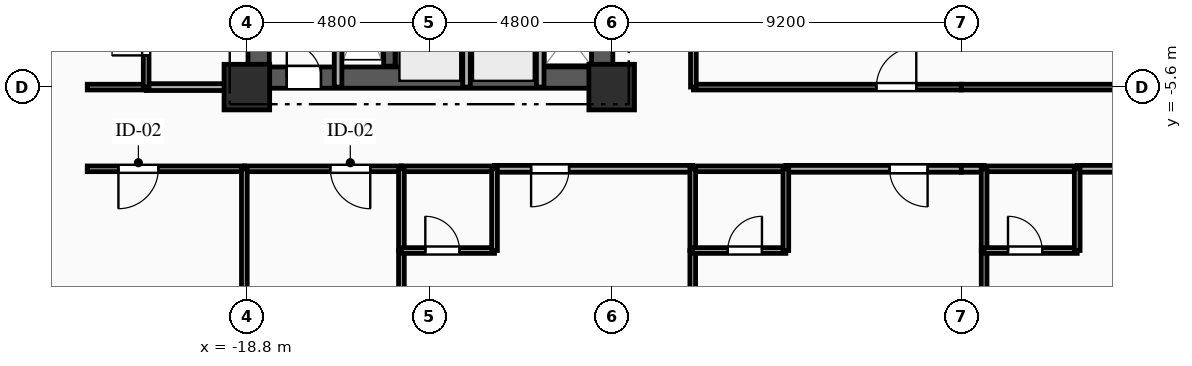
"""IFC4 building model, lengths in metres.
Left out: names, types, materials, properties, quantities, classifications, styles, units other than length and angle.
Written with IfcOpenShell. Run it as: python <this file> out.ifc"""

import sys

from ifc_helpers import new_model, si_unit, direction, frame, frame_2d, origin, origin_2d, place, context, subcontext, project, spatial, rectangle, extrude, element, fill, save


model = new_model("IFC4")
c1 = context("Model", 3, precision=1e-05, world=origin(), true_north=direction((0.0, 1.0)))
c2 = subcontext(c1, "Body", "Model", "MODEL_VIEW")
j1 = project(units=[si_unit("LENGTHUNIT", "METRE"), si_unit("PLANEANGLEUNIT", "RADIAN")], contexts=[c1])
p1 = place(None, origin())
s1 = spatial("IfcSite", under=j1, at=p1, CompositionType="ELEMENT")
p2 = place(p1, origin())
s2 = spatial("IfcBuilding", under=s1, at=p2, CompositionType="ELEMENT")
p3 = place(p2, frame((0.0, 0.0, 40.4)))
s3 = spatial("IfcBuildingStorey", under=s2, at=p3, CompositionType="ELEMENT", Elevation=40.4)
for number, where, z_axis, x_axis in (
    (1, (-18.8, -5.6, 0.0), (0.0, 0.0, 1.0), (1.0, 0.0, 0.0)),
    (2, (-9.2, -5.6, 0.0), (0.0, 0.0, 1.0), (1.0, 0.0, 0.0)),
):
    element("IfcColumn", number, at=place(p3, frame(where, z_axis=z_axis, x_axis=x_axis)), inside=s3, PredefinedType="COLUMN", context=c2, shape_type="SweptSolid", body=[
        extrude(rectangle(XDim=1.2, YDim=1.2, at=origin_2d()), origin(), (0.0, 0.0, 1.0), 3.35),
    ])
p4 = place(p3, frame((-18.8, -5.35, 0.0), z_axis=(0.0, 0.0, 1.0), x_axis=(1.0, 0.0, 0.0)))
e3 = element("IfcWall", 3, at=p4, inside=s3, PredefinedType="SHEAR", context=c2, shape_type="SweptSolid", body=[
    extrude(rectangle(XDim=9.6, YDim=0.56, at=frame_2d((4.8, 0.0))), origin(), (0.0, 0.0, 1.0), 3.035),
])
p5 = place(p4, frame((1.05, 0.0, 0.0)))
e4 = element("IfcOpeningElement", 4, at=p5, cuts=e3, PredefinedType="OPENING", context=c2, shape_type="SweptSolid", body=[
    extrude(rectangle(XDim=0.9, YDim=2.1, at=frame_2d((0.45, 1.05))), frame((0.0, 0.29, 0.0), z_axis=(0.0, -1.0, 0.0), x_axis=(1.0, 0.0, 0.0)), (0.0, 0.0, 1.0), 0.58),
])
p6 = place(p3, frame((-18.49, -5.05, 0.0), z_axis=(0.0, 0.0, 1.0), x_axis=(0.0, 1.0, 0.0)))
e5 = element("IfcWall", 5, at=p6, inside=s3, PredefinedType="SHEAR", context=c2, shape_type="SweptSolid", body=[
    extrude(rectangle(XDim=10.1, YDim=0.56, at=frame_2d((5.05, 0.0))), origin(), (0.0, 0.0, 1.0), 3.035),
])
p7 = place(p3, frame((-9.45, -5.05, 0.0), z_axis=(0.0, 0.0, 1.0), x_axis=(0.0, 1.0, 0.0)))
e6 = element("IfcWall", 6, at=p7, inside=s3, PredefinedType="SHEAR", context=c2, shape_type="SweptSolid", body=[
    extrude(rectangle(XDim=10.1, YDim=0.56, at=frame_2d((5.05, 0.0))), origin(), (0.0, 0.0, 1.0), 3.035),
])
p8 = place(p7, frame((7.175, 0.0, 0.0)))
e7 = element("IfcOpeningElement", 7, at=p8, cuts=e6, PredefinedType="OPENING", context=c2, shape_type="SweptSolid", body=[
    extrude(rectangle(XDim=0.9, YDim=2.1, at=frame_2d((0.45, 1.05))), frame((0.0, 0.29, 0.0), z_axis=(0.0, -1.0, 0.0), x_axis=(1.0, 0.0, 0.0)), (0.0, 0.0, 1.0), 0.58),
])
p9 = place(p7, frame((2.4, 0.0, 0.0)))
e8 = element("IfcOpeningElement", 8, at=p9, cuts=e6, PredefinedType="OPENING", context=c2, shape_type="SweptSolid", body=[
    extrude(rectangle(XDim=1.2, YDim=2.15, at=frame_2d((0.6, 1.075))), frame((0.0, 0.29, 0.0), z_axis=(0.0, -1.0, 0.0), x_axis=(1.0, 0.0, 0.0)), (0.0, 0.0, 1.0), 0.58),
])
p10 = place(p3, frame((-15.05, -5.05, 0.0), z_axis=(0.0, 0.0, 1.0), x_axis=(0.0, 1.0, 0.0)))
e9 = element("IfcWall", 9, at=p10, inside=s3, PredefinedType="SHEAR", context=c2, shape_type="SweptSolid", body=[
    extrude(rectangle(XDim=10.1, YDim=0.3, at=frame_2d((5.05, 0.0))), origin(), (0.0, 0.0, 1.0), 3.035),
])
p11 = place(p3, frame((-16.4, -5.6, 0.0), z_axis=(0.0, 0.0, 1.0), x_axis=(0.0, 1.0, 0.0)))
e10 = element("IfcWall", 10, at=p11, inside=s3, PredefinedType="PARTITIONING", context=c2, shape_type="SweptSolid", body=[
    extrude(rectangle(XDim=3.49, YDim=0.2, at=frame_2d((1.745, 0.0))), origin(), (0.0, 0.0, 1.0), 3.035),
])
for number, where, z_axis, x_axis in (
    (11, (-13.02, -5.6, 0.0), (0.0, 0.0, 1.0), (0.0, 1.0, 0.0)),
    (12, (-11.08, -5.6, 0.0), (0.0, 0.0, 1.0), (0.0, 1.0, 0.0)),
):
    element("IfcWall", number, at=place(p3, frame(where, z_axis=z_axis, x_axis=x_axis)), inside=s3, PredefinedType="PARTITIONING", context=c2, shape_type="SweptSolid", body=[
        extrude(rectangle(XDim=2.25, YDim=0.2, at=frame_2d((1.125, 0.0))), origin(), (0.0, 0.0, 1.0), 3.035),
    ])
p12 = place(p3, frame((-21.45, -5.6, 0.0), z_axis=(0.0, 0.0, 1.0), x_axis=(1.0, 0.0, 0.0)))
e13 = element("IfcWall", 13, at=p12, inside=s3, PredefinedType="PARTITIONING", context=c2, shape_type="SweptSolid", body=[
    extrude(rectangle(XDim=2.65, YDim=0.18, at=frame_2d((1.325, 0.0))), origin(), (0.0, 0.0, 1.0), 3.035),
])
p13 = place(p3, frame((-23.0, -5.6, 0.0), z_axis=(0.0, 0.0, 1.0), x_axis=(1.0, 0.0, 0.0)))
e14 = element("IfcWall", 14, at=p13, inside=s3, PredefinedType="PLUMBINGWALL", context=c2, shape_type="SweptSolid", body=[
    extrude(rectangle(XDim=1.55, YDim=0.15, at=frame_2d((0.775, 0.0))), origin(), (0.0, 0.0, 1.0), 3.035),
])
p14 = place(p3, frame((-18.866, -7.75, 0.0), z_axis=(0.0, 0.0, 1.0), x_axis=(-1.0, 0.0, 0.0)))
e15 = element("IfcWall", 15, at=p14, inside=s3, PredefinedType="PARTITIONING", context=c2, shape_type="SweptSolid", body=[
    extrude(rectangle(XDim=4.134, YDim=0.15, at=frame_2d((2.067, 0.0))), origin(), (0.0, 0.0, 1.0), 3.035),
])
p15 = place(p14, frame((2.263, 0.0, 0.0)))
e16 = element("IfcOpeningElement", 16, at=p15, cuts=e15, PredefinedType="OPENING", context=c2, shape_type="SweptSolid", body=[
    extrude(rectangle(XDim=1.05, YDim=2.15, at=frame_2d((0.525, 1.075))), frame((0.0, 0.085, 0.0), z_axis=(0.0, -1.0, 0.0), x_axis=(1.0, 0.0, 0.0)), (0.0, 0.0, 1.0), 0.17),
])
p16 = place(p3, frame((-14.733, -7.75, 0.0), z_axis=(0.0, 0.0, 1.0), x_axis=(-1.0, 0.0, 0.0)))
e17 = element("IfcWall", 17, at=p16, inside=s3, PredefinedType="PARTITIONING", context=c2, shape_type="SweptSolid", body=[
    extrude(rectangle(XDim=4.134, YDim=0.15, at=frame_2d((2.067, 0.0))), origin(), (0.0, 0.0, 1.0), 3.035),
])
p17 = place(p16, frame((0.82, 0.0, 0.0)))
e18 = element("IfcOpeningElement", 18, at=p17, cuts=e17, PredefinedType="OPENING", context=c2, shape_type="SweptSolid", body=[
    extrude(rectangle(XDim=1.05, YDim=2.15, at=frame_2d((0.525, 1.075))), frame((0.0, 0.085, 0.0), z_axis=(0.0, -1.0, 0.0), x_axis=(1.0, 0.0, 0.0)), (0.0, 0.0, 1.0), 0.17),
])
p18 = place(p3, frame((-7.067, -7.75, 0.0), z_axis=(0.0, 0.0, 1.0), x_axis=(-1.0, 0.0, 0.0)))
e19 = element("IfcWall", 19, at=p18, inside=s3, PredefinedType="PARTITIONING", context=c2, shape_type="SweptSolid", body=[
    extrude(rectangle(XDim=5.216, YDim=0.18, at=frame_2d((2.608, 0.0))), origin(), (0.0, 0.0, 1.0), 3.035),
])
p19 = place(p18, frame((3.254, 0.0, 0.0)))
e20 = element("IfcOpeningElement", 20, at=p19, cuts=e19, PredefinedType="OPENING", context=c2, shape_type="SweptSolid", body=[
    extrude(rectangle(XDim=1.0, YDim=2.15, at=frame_2d((0.5, 1.075))), frame((0.0, 0.1, 0.0), z_axis=(0.0, -1.0, 0.0), x_axis=(1.0, 0.0, 0.0)), (0.0, 0.0, 1.0), 0.2),
])
p20 = place(p3, frame((-12.283, -7.75, 0.0), z_axis=(0.0, 0.0, 1.0), x_axis=(-1.0, 0.0, 0.0)))
e21 = element("IfcWall", 21, at=p20, inside=s3, PredefinedType="PLUMBINGWALL", context=c2, shape_type="SweptSolid", body=[
    extrude(rectangle(XDim=2.45, YDim=0.15, at=frame_2d((1.225, 0.0))), origin(), (0.0, 0.0, 1.0), 3.035),
])
p21 = place(p3, frame((0.0, -7.75, 0.0), z_axis=(0.0, 0.0, 1.0), x_axis=(-1.0, 0.0, 0.0)))
e22 = element("IfcWall", 22, at=p21, inside=s3, PredefinedType="PARTITIONING", context=c2, shape_type="SweptSolid", body=[
    extrude(rectangle(XDim=4.617, YDim=0.18, at=frame_2d((2.309, 0.0))), origin(), (0.0, 0.0, 1.0), 3.035),
])
p22 = place(p21, frame((0.887, 0.0, 0.0)))
e23 = element("IfcOpeningElement", 23, at=p22, cuts=e22, PredefinedType="OPENING", context=c2, shape_type="SweptSolid", body=[
    extrude(rectangle(XDim=1.0, YDim=2.15, at=frame_2d((0.5, 1.075))), frame((0.0, 0.1, 0.0), z_axis=(0.0, -1.0, 0.0), x_axis=(1.0, 0.0, 0.0)), (0.0, 0.0, 1.0), 0.2),
])
p23 = place(p3, frame((-4.617, -7.75, 0.0), z_axis=(0.0, 0.0, 1.0), x_axis=(-1.0, 0.0, 0.0)))
e24 = element("IfcWall", 24, at=p23, inside=s3, PredefinedType="PLUMBINGWALL", context=c2, shape_type="SweptSolid", body=[
    extrude(rectangle(XDim=2.45, YDim=0.15, at=frame_2d((1.225, 0.0))), origin(), (0.0, 0.0, 1.0), 3.035),
])
p24 = place(p3, frame((-7.05, -5.6, 0.0), z_axis=(0.0, 0.0, 1.0), x_axis=(1.0, 0.0, 0.0)))
e25 = element("IfcWall", 25, at=p24, inside=s3, PredefinedType="PARTITIONING", context=c2, shape_type="SweptSolid", body=[
    extrude(rectangle(XDim=7.05, YDim=0.15, at=frame_2d((3.525, 0.0))), origin(), (0.0, 0.0, 1.0), 2.52),
])
p25 = place(p24, frame((4.815, 0.0, 0.0)))
e26 = element("IfcOpeningElement", 26, at=p25, cuts=e25, PredefinedType="OPENING", context=c2, shape_type="SweptSolid", body=[
    extrude(rectangle(XDim=1.05, YDim=2.15, at=frame_2d((0.525, 1.075))), frame((0.0, 0.085, 0.0), z_axis=(0.0, -1.0, 0.0), x_axis=(1.0, 0.0, 0.0)), (0.0, 0.0, 1.0), 0.17),
])
p26 = place(p3, frame((0.6, -7.75, 0.0), z_axis=(0.0, 0.0, 1.0), x_axis=(-1.0, 0.0, 0.0)))
e27 = element("IfcWall", 27, at=p26, inside=s3, PredefinedType="PARTITIONING", context=c2, shape_type="SweptSolid", body=[
    extrude(rectangle(XDim=0.6, YDim=0.18, at=frame_2d((0.3, 0.0))), origin(), (0.0, 0.0, 1.0), 3.035),
])
p27 = place(p3, frame((8.267, -7.75, 0.0), z_axis=(0.0, 0.0, 1.0), x_axis=(-1.0, 0.0, 0.0)))
e28 = element("IfcWall", 28, at=p27, inside=s3, PredefinedType="PARTITIONING", context=c2, shape_type="SweptSolid", body=[
    extrude(rectangle(XDim=5.217, YDim=0.18, at=frame_2d((2.608, 0.0))), origin(), (0.0, 0.0, 1.0), 3.035),
])
p28 = place(p27, frame((3.255, 0.0, 0.0)))
e29 = element("IfcOpeningElement", 29, at=p28, cuts=e28, PredefinedType="OPENING", context=c2, shape_type="SweptSolid", body=[
    extrude(rectangle(XDim=1.0, YDim=2.15, at=frame_2d((0.5, 1.075))), frame((0.0, 0.1, 0.0), z_axis=(0.0, -1.0, 0.0), x_axis=(1.0, 0.0, 0.0)), (0.0, 0.0, 1.0), 0.2),
])
p29 = place(p3, frame((3.05, -7.75, 0.0), z_axis=(0.0, 0.0, 1.0), x_axis=(-1.0, 0.0, 0.0)))
e30 = element("IfcWall", 30, at=p29, inside=s3, PredefinedType="PLUMBINGWALL", context=c2, shape_type="SweptSolid", body=[
    extrude(rectangle(XDim=2.45, YDim=0.15, at=frame_2d((1.225, 0.0))), origin(), (0.0, 0.0, 1.0), 3.035),
])
p30 = place(p3, frame((0.0, -5.6, 0.0), z_axis=(0.0, 0.0, 1.0), x_axis=(1.0, 0.0, 0.0)))
e31 = element("IfcWall", 31, at=p30, inside=s3, PredefinedType="PARTITIONING", context=c2, shape_type="SweptSolid", body=[
    extrude(rectangle(XDim=7.05, YDim=0.15, at=frame_2d((3.525, 0.0))), origin(), (0.0, 0.0, 1.0), 2.52),
])
p31 = place(p3, frame((-7.05, 1.45, 0.0), z_axis=(0.0, 0.0, 1.0), x_axis=(0.0, -1.0, 0.0)))
e32 = element("IfcWall", 32, at=p31, inside=s3, PredefinedType="PARTITIONING", context=c2, shape_type="SweptSolid", body=[
    extrude(rectangle(XDim=7.05, YDim=0.15, at=frame_2d((3.525, 0.0))), origin(), (0.0, 0.0, 1.0), 3.035),
])
p32 = place(p3, frame((-21.45, -5.6, 0.0), z_axis=(0.0, 0.0, 1.0), x_axis=(0.0, 1.0, 0.0)))
e33 = element("IfcWall", 33, at=p32, inside=s3, PredefinedType="PLUMBINGWALL", context=c2, shape_type="SweptSolid", body=[
    extrude(rectangle(XDim=2.35, YDim=0.15, at=frame_2d((1.175, 0.0))), origin(), (0.0, 0.0, 1.0), 3.035),
])
p33 = place(p32, frame((0.834, 0.0, 0.0)))
e34 = element("IfcOpeningElement", 34, at=p33, cuts=e33, PredefinedType="OPENING", context=c2, shape_type="SweptSolid", body=[
    extrude(rectangle(XDim=0.9, YDim=2.1, at=frame_2d((0.45, 1.05))), frame((0.0, 0.085, 0.0), z_axis=(0.0, -1.0, 0.0), x_axis=(1.0, 0.0, 0.0)), (0.0, 0.0, 1.0), 0.17),
])
p34 = place(p3, frame((-18.866, -7.75, 0.0), z_axis=(0.0, 0.0, 1.0), x_axis=(0.0, -1.0, 0.0)))
e35 = element("IfcWall", 35, at=p34, inside=s3, PredefinedType="PARTITIONING", context=c2, shape_type="SweptSolid", body=[
    extrude(rectangle(XDim=11.65, YDim=0.15, at=frame_2d((5.825, 0.0))), origin(), (0.0, 0.0, 1.0), 2.52),
])
p35 = place(p3, frame((-14.733, -9.9, 0.0), z_axis=(0.0, 0.0, 1.0), x_axis=(0.0, -1.0, 0.0)))
e36 = element("IfcWall", 36, at=p35, inside=s3, PredefinedType="PARTITIONING", context=c2, shape_type="SweptSolid", body=[
    extrude(rectangle(XDim=9.5, YDim=0.15, at=frame_2d((4.75, 0.0))), origin(), (0.0, 0.0, 1.0), 3.035),
])
p36 = place(p3, frame((-14.733, -7.75, 0.0), z_axis=(0.0, 0.0, 1.0), x_axis=(0.0, -1.0, 0.0)))
e37 = element("IfcWall", 37, at=p36, inside=s3, PredefinedType="PLUMBINGWALL", context=c2, shape_type="SweptSolid", body=[
    extrude(rectangle(XDim=2.15, YDim=0.15, at=frame_2d((1.075, 0.0))), origin(), (0.0, 0.0, 1.0), 3.035),
])
p37 = place(p3, frame((-14.733, -9.9, 0.0), z_axis=(0.0, 0.0, 1.0), x_axis=(1.0, 0.0, 0.0)))
e38 = element("IfcWall", 38, at=p37, inside=s3, PredefinedType="PLUMBINGWALL", context=c2, shape_type="SweptSolid", body=[
    extrude(rectangle(XDim=2.45, YDim=0.15, at=frame_2d((1.225, 0.0))), origin(), (0.0, 0.0, 1.0), 3.035),
])
p38 = place(p37, frame((0.629, 0.0, 0.0)))
e39 = element("IfcOpeningElement", 39, at=p38, cuts=e38, PredefinedType="OPENING", context=c2, shape_type="SweptSolid", body=[
    extrude(rectangle(XDim=0.9, YDim=2.1, at=frame_2d((0.45, 1.05))), frame((0.0, 0.085, 0.0), z_axis=(0.0, -1.0, 0.0), x_axis=(1.0, 0.0, 0.0)), (0.0, 0.0, 1.0), 0.17),
])
p39 = place(p3, frame((-12.283, -9.9, 0.0), z_axis=(0.0, 0.0, 1.0), x_axis=(0.0, 1.0, 0.0)))
e40 = element("IfcWall", 40, at=p39, inside=s3, PredefinedType="PLUMBINGWALL", context=c2, shape_type="SweptSolid", body=[
    extrude(rectangle(XDim=2.15, YDim=0.15, at=frame_2d((1.075, 0.0))), origin(), (0.0, 0.0, 1.0), 3.035),
])
p40 = place(p3, frame((-7.067, -9.9, 0.0), z_axis=(0.0, 0.0, 1.0), x_axis=(0.0, -1.0, 0.0)))
e41 = element("IfcWall", 41, at=p40, inside=s3, PredefinedType="PARTITIONING", context=c2, shape_type="SweptSolid", body=[
    extrude(rectangle(XDim=9.5, YDim=0.15, at=frame_2d((4.75, 0.0))), origin(), (0.0, 0.0, 1.0), 3.035),
])
p41 = place(p3, frame((-7.067, -7.75, 0.0), z_axis=(0.0, 0.0, 1.0), x_axis=(0.0, -1.0, 0.0)))
e42 = element("IfcWall", 42, at=p41, inside=s3, PredefinedType="PLUMBINGWALL", context=c2, shape_type="SweptSolid", body=[
    extrude(rectangle(XDim=2.15, YDim=0.15, at=frame_2d((1.075, 0.0))), origin(), (0.0, 0.0, 1.0), 3.035),
])
p42 = place(p3, frame((-7.067, -9.9, 0.0), z_axis=(0.0, 0.0, 1.0), x_axis=(1.0, 0.0, 0.0)))
e43 = element("IfcWall", 43, at=p42, inside=s3, PredefinedType="PLUMBINGWALL", context=c2, shape_type="SweptSolid", body=[
    extrude(rectangle(XDim=2.45, YDim=0.15, at=frame_2d((1.225, 0.0))), origin(), (0.0, 0.0, 1.0), 3.035),
])
p43 = place(p42, frame((0.921, 0.0, 0.0)))
e44 = element("IfcOpeningElement", 44, at=p43, cuts=e43, PredefinedType="OPENING", context=c2, shape_type="SweptSolid", body=[
    extrude(rectangle(XDim=0.9, YDim=2.1, at=frame_2d((0.45, 1.05))), frame((0.0, 0.085, 0.0), z_axis=(0.0, -1.0, 0.0), x_axis=(1.0, 0.0, 0.0)), (0.0, 0.0, 1.0), 0.17),
])
p44 = place(p3, frame((-4.617, -9.9, 0.0), z_axis=(0.0, 0.0, 1.0), x_axis=(0.0, 1.0, 0.0)))
e45 = element("IfcWall", 45, at=p44, inside=s3, PredefinedType="PLUMBINGWALL", context=c2, shape_type="SweptSolid", body=[
    extrude(rectangle(XDim=2.15, YDim=0.15, at=frame_2d((1.075, 0.0))), origin(), (0.0, 0.0, 1.0), 3.035),
])
p45 = place(p3, frame((0.6, -9.9, 0.0), z_axis=(0.0, 0.0, 1.0), x_axis=(0.0, -1.0, 0.0)))
e46 = element("IfcWall", 46, at=p45, inside=s3, PredefinedType="PARTITIONING", context=c2, shape_type="SweptSolid", body=[
    extrude(rectangle(XDim=9.5, YDim=0.15, at=frame_2d((4.75, 0.0))), origin(), (0.0, 0.0, 1.0), 3.035),
])
p46 = place(p3, frame((0.6, -7.75, 0.0), z_axis=(0.0, 0.0, 1.0), x_axis=(0.0, -1.0, 0.0)))
e47 = element("IfcWall", 47, at=p46, inside=s3, PredefinedType="PLUMBINGWALL", context=c2, shape_type="SweptSolid", body=[
    extrude(rectangle(XDim=2.15, YDim=0.15, at=frame_2d((1.075, 0.0))), origin(), (0.0, 0.0, 1.0), 3.035),
])
p47 = place(p3, frame((0.6, -9.9, 0.0), z_axis=(0.0, 0.0, 1.0), x_axis=(1.0, 0.0, 0.0)))
e48 = element("IfcWall", 48, at=p47, inside=s3, PredefinedType="PLUMBINGWALL", context=c2, shape_type="SweptSolid", body=[
    extrude(rectangle(XDim=2.45, YDim=0.15, at=frame_2d((1.225, 0.0))), origin(), (0.0, 0.0, 1.0), 3.035),
])
p48 = place(p47, frame((0.629, 0.0, 0.0)))
e49 = element("IfcOpeningElement", 49, at=p48, cuts=e48, PredefinedType="OPENING", context=c2, shape_type="SweptSolid", body=[
    extrude(rectangle(XDim=0.9, YDim=2.1, at=frame_2d((0.45, 1.05))), frame((0.0, 0.085, 0.0), z_axis=(0.0, -1.0, 0.0), x_axis=(1.0, 0.0, 0.0)), (0.0, 0.0, 1.0), 0.17),
])
p49 = place(p3, frame((3.05, -9.9, 0.0), z_axis=(0.0, 0.0, 1.0), x_axis=(0.0, 1.0, 0.0)))
e50 = element("IfcWall", 50, at=p49, inside=s3, PredefinedType="PLUMBINGWALL", context=c2, shape_type="SweptSolid", body=[
    extrude(rectangle(XDim=2.15, YDim=0.15, at=frame_2d((1.075, 0.0))), origin(), (0.0, 0.0, 1.0), 3.035),
])
p50 = place(p5, origin())
e51 = element("IfcDoor", 51, at=p50, inside=s3, OperationType="SINGLE_SWING_LEFT", PredefinedType="DOOR", context=c2, shape_type="SweptSolid", body=[
    extrude(rectangle(XDim=0.9, YDim=2.1, at=frame_2d((0.45, 1.05))), frame((0.0, 0.025, 0.0), z_axis=(0.0, -1.0, 0.0), x_axis=(1.0, 0.0, 0.0)), (0.0, 0.0, 1.0), 0.05),
])
fill(e4, e51)
p51 = place(p15, origin())
e52 = element("IfcDoor", 52, at=p51, inside=s3, OperationType="SINGLE_SWING_RIGHT", PredefinedType="DOOR", context=c2, shape_type="SweptSolid", body=[
    extrude(rectangle(XDim=1.05, YDim=2.15, at=frame_2d((0.525, 1.075))), frame((0.0, 0.025, 0.0), z_axis=(0.0, -1.0, 0.0), x_axis=(1.0, 0.0, 0.0)), (0.0, 0.0, 1.0), 0.05),
])
fill(e16, e52)
p52 = place(p17, origin())
e53 = element("IfcDoor", 53, at=p52, inside=s3, OperationType="SINGLE_SWING_LEFT", PredefinedType="DOOR", context=c2, shape_type="SweptSolid", body=[
    extrude(rectangle(XDim=1.05, YDim=2.15, at=frame_2d((0.525, 1.075))), frame((0.0, 0.025, 0.0), z_axis=(0.0, -1.0, 0.0), x_axis=(1.0, 0.0, 0.0)), (0.0, 0.0, 1.0), 0.05),
])
fill(e18, e53)
p53 = place(p19, origin())
e54 = element("IfcDoor", 54, at=p53, inside=s3, OperationType="SINGLE_SWING_RIGHT", PredefinedType="DOOR", context=c2, shape_type="SweptSolid", body=[
    extrude(rectangle(XDim=1.0, YDim=2.15, at=frame_2d((0.5, 1.075))), frame((0.0, 0.025, 0.0), z_axis=(0.0, -1.0, 0.0), x_axis=(1.0, 0.0, 0.0)), (0.0, 0.0, 1.0), 0.05),
])
fill(e20, e54)
p54 = place(p22, origin())
e55 = element("IfcDoor", 55, at=p54, inside=s3, OperationType="SINGLE_SWING_LEFT", PredefinedType="DOOR", context=c2, shape_type="SweptSolid", body=[
    extrude(rectangle(XDim=1.0, YDim=2.15, at=frame_2d((0.5, 1.075))), frame((0.0, 0.025, 0.0), z_axis=(0.0, -1.0, 0.0), x_axis=(1.0, 0.0, 0.0)), (0.0, 0.0, 1.0), 0.05),
])
fill(e23, e55)
p55 = place(p25, origin())
e56 = element("IfcDoor", 56, at=p55, inside=s3, OperationType="SINGLE_SWING_RIGHT", PredefinedType="DOOR", context=c2, shape_type="SweptSolid", body=[
    extrude(rectangle(XDim=1.05, YDim=2.15, at=frame_2d((0.525, 1.075))), frame((0.0, 0.025, 0.0), z_axis=(0.0, -1.0, 0.0), x_axis=(1.0, 0.0, 0.0)), (0.0, 0.0, 1.0), 0.05),
])
fill(e26, e56)
p56 = place(p33, origin())
e57 = element("IfcDoor", 57, at=p56, inside=s3, OperationType="SINGLE_SWING_LEFT", PredefinedType="DOOR", context=c2, shape_type="SweptSolid", body=[
    extrude(rectangle(XDim=0.9, YDim=2.1, at=frame_2d((0.45, 1.05))), frame((0.0, 0.025, 0.0), z_axis=(0.0, -1.0, 0.0), x_axis=(1.0, 0.0, 0.0)), (0.0, 0.0, 1.0), 0.05),
])
fill(e34, e57)
p57 = place(p38, origin())
e58 = element("IfcDoor", 58, at=p57, inside=s3, OperationType="SINGLE_SWING_LEFT", PredefinedType="DOOR", context=c2, shape_type="SweptSolid", body=[
    extrude(rectangle(XDim=0.9, YDim=2.1, at=frame_2d((0.45, 1.05))), frame((0.0, 0.025, 0.0), z_axis=(0.0, -1.0, 0.0), x_axis=(1.0, 0.0, 0.0)), (0.0, 0.0, 1.0), 0.05),
])
fill(e39, e58)
p58 = place(p43, origin())
e59 = element("IfcDoor", 59, at=p58, inside=s3, OperationType="SINGLE_SWING_RIGHT", PredefinedType="DOOR", context=c2, shape_type="SweptSolid", body=[
    extrude(rectangle(XDim=0.9, YDim=2.1, at=frame_2d((0.45, 1.05))), frame((0.0, 0.025, 0.0), z_axis=(0.0, -1.0, 0.0), x_axis=(1.0, 0.0, 0.0)), (0.0, 0.0, 1.0), 0.05),
])
fill(e44, e59)
p59 = place(p48, origin())
e60 = element("IfcDoor", 60, at=p59, inside=s3, OperationType="SINGLE_SWING_LEFT", PredefinedType="DOOR", context=c2, shape_type="SweptSolid", body=[
    extrude(rectangle(XDim=0.9, YDim=2.1, at=frame_2d((0.45, 1.05))), frame((0.0, 0.025, 0.0), z_axis=(0.0, -1.0, 0.0), x_axis=(1.0, 0.0, 0.0)), (0.0, 0.0, 1.0), 0.05),
])
fill(e49, e60)
save(model, sys.argv[1])
